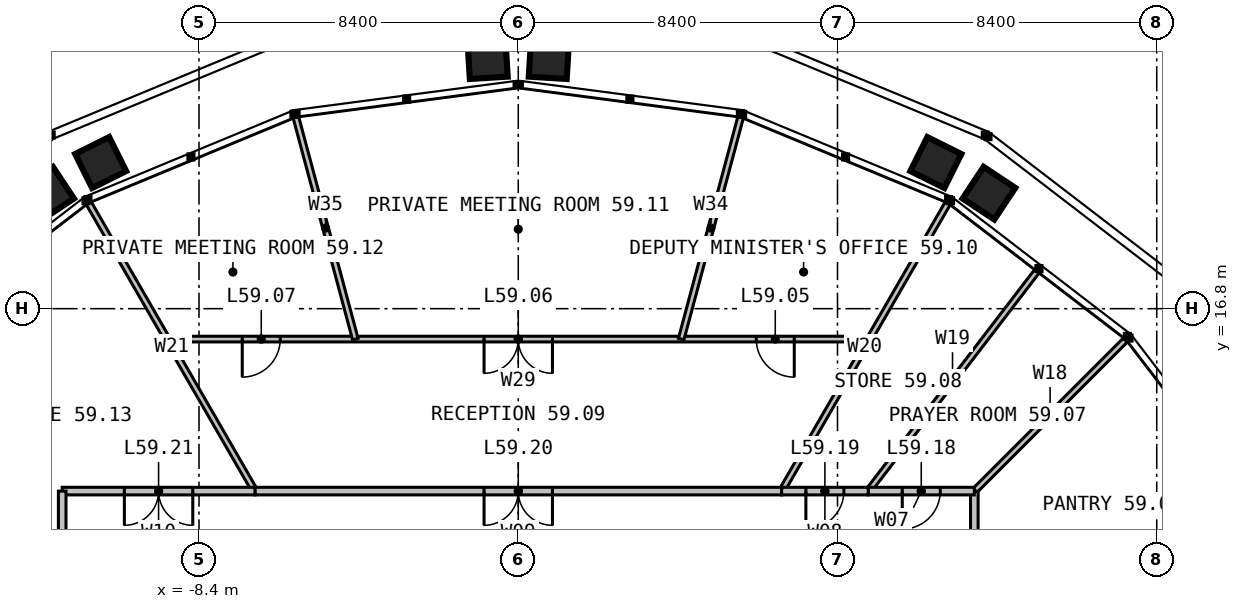
"""IFC4 building model, lengths in metres.
Left out: names, types, materials, properties, quantities, classifications, styles, units other than length and angle.
Written with IfcOpenShell. Run it as: python <this file> out.ifc"""

import sys

from ifc_helpers import new_model, si_unit, direction, frame, frame_2d, origin, place, context, subcontext, project, spatial, rectangle, extrude, element, fill, save


model = new_model("IFC4")
c1 = context("Model", 3, precision=1e-05, world=origin(), true_north=direction((0.0, 1.0)))
c2 = subcontext(c1, "Body", "Model", "MODEL_VIEW")
j1 = project(units=[si_unit("LENGTHUNIT", "METRE"), si_unit("PLANEANGLEUNIT", "RADIAN")], contexts=[c1])
p1 = place(None, origin())
s1 = spatial("IfcSite", under=j1, at=p1, CompositionType="ELEMENT")
p2 = place(p1, origin())
s2 = spatial("IfcBuilding", under=s1, at=p2, CompositionType="ELEMENT")
p3 = place(p2, frame((0.0, 0.0, 244.0)))
s3 = spatial("IfcBuildingStorey", under=s2, at=p3, CompositionType="ELEMENT", Elevation=244.0)
p4 = place(p3, frame((12.0, 6.928, 0.0), z_axis=(0.0, 0.0, 1.0), x_axis=(0.866020224182, 0.500008971228, 0.0)))
e1 = element("IfcWall", 1, at=p4, inside=s3, PredefinedType="PARTITIONING", context=c2, shape_type="SweptSolid", body=[
    extrude(rectangle(XDim=8.753, YDim=0.15, at=frame_2d((4.376, 0.0))), origin(), (0.0, 0.0, 1.0), 2.79),
])
p5 = place(p3, frame((12.0, 12.0, 0.0), z_axis=(0.0, 0.0, 1.0), x_axis=(0.707106781187, 0.707106781187, 0.0)))
e2 = element("IfcWall", 2, at=p5, inside=s3, PredefinedType="PARTITIONING", context=c2, shape_type="SweptSolid", body=[
    extrude(rectangle(XDim=5.639, YDim=0.15, at=frame_2d((2.819, 0.0))), origin(), (0.0, 0.0, 1.0), 2.79),
])
p6 = place(p3, frame((9.208, 12.0, 0.0), z_axis=(0.0, 0.0, 1.0), x_axis=(0.608740848729, 0.793369131671, 0.0)))
e3 = element("IfcWall", 3, at=p6, inside=s3, PredefinedType="PARTITIONING", context=c2, shape_type="SweptSolid", body=[
    extrude(rectangle(XDim=7.29, YDim=0.15, at=frame_2d((3.645, 0.0))), origin(), (0.0, 0.0, 1.0), 2.79),
])
for number, where, z_axis, x_axis in (
    (4, (6.928, 12.0, 0.0), (0.0, 0.0, 1.0), (0.5, 0.866, 0.0)),
    (5, (-6.928, 12.0, 0.0), (0.0, 0.0, 1.0), (-0.5, 0.866, 0.0)),
    (6, (-12.0, 6.928, 0.0), (0.0, 0.0, 1.0), (-0.866, 0.5, 0.0)),
):
    element("IfcWall", number, at=place(p3, frame(where, z_axis=z_axis, x_axis=x_axis)), inside=s3, PredefinedType="PARTITIONING", context=c2, shape_type="SweptSolid", body=[
        extrude(rectangle(XDim=8.753, YDim=0.15, at=frame_2d((4.376, 0.0))), origin(), (0.0, 0.0, 1.0), 2.79),
    ])
p7 = place(p3, frame((12.0, 6.928, 0.0), z_axis=(0.0, 0.0, 1.0), x_axis=(0.0, 1.0, 0.0)))
e7 = element("IfcWall", 7, at=p7, inside=s3, PredefinedType="PARTITIONING", context=c2, shape_type="SweptSolid", body=[
    extrude(rectangle(XDim=5.072, YDim=0.2, at=frame_2d((2.536, 0.0))), origin(), (0.0, 0.0, 1.0), 3.8),
])
p8 = place(p7, frame((2.036, 0.0, 0.0)))
e8 = element("IfcOpeningElement", 8, at=p8, cuts=e7, PredefinedType="OPENING", context=c2, shape_type="SweptSolid", body=[
    extrude(rectangle(XDim=1.0, YDim=2.2, at=frame_2d((0.5, 1.1))), frame((0.0, 0.11, 0.0), z_axis=(0.0, -1.0, 0.0), x_axis=(1.0, 0.0, 0.0)), (0.0, 0.0, 1.0), 0.22),
])
p9 = place(p3, frame((12.0, 12.0, 0.0), z_axis=(0.0, 0.0, 1.0), x_axis=(-1.0, 0.0, 0.0)))
e9 = element("IfcWall", 9, at=p9, inside=s3, PredefinedType="PARTITIONING", context=c2, shape_type="SweptSolid", body=[
    extrude(rectangle(XDim=2.792, YDim=0.2, at=frame_2d((1.396, 0.0))), origin(), (0.0, 0.0, 1.0), 3.8),
])
p10 = place(p9, frame((0.896, 0.0, 0.0)))
e10 = element("IfcOpeningElement", 10, at=p10, cuts=e9, PredefinedType="OPENING", context=c2, shape_type="SweptSolid", body=[
    extrude(rectangle(XDim=1.0, YDim=2.2, at=frame_2d((0.5, 1.1))), frame((0.0, 0.11, 0.0), z_axis=(0.0, -1.0, 0.0), x_axis=(1.0, 0.0, 0.0)), (0.0, 0.0, 1.0), 0.22),
])
p11 = place(p3, frame((9.208, 12.0, 0.0), z_axis=(0.0, 0.0, 1.0), x_axis=(-1.0, 0.0, 0.0)))
e11 = element("IfcWall", 11, at=p11, inside=s3, PredefinedType="PARTITIONING", context=c2, shape_type="SweptSolid", body=[
    extrude(rectangle(XDim=2.28, YDim=0.2, at=frame_2d((1.14, 0.0))), origin(), (0.0, 0.0, 1.0), 3.8),
])
p12 = place(p11, frame((0.64, 0.0, 0.0)))
e12 = element("IfcOpeningElement", 12, at=p12, cuts=e11, PredefinedType="OPENING", context=c2, shape_type="SweptSolid", body=[
    extrude(rectangle(XDim=1.0, YDim=2.2, at=frame_2d((0.5, 1.1))), frame((0.0, 0.11, 0.0), z_axis=(0.0, -1.0, 0.0), x_axis=(1.0, 0.0, 0.0)), (0.0, 0.0, 1.0), 0.22),
])
p13 = place(p3, frame((9.238, 16.0, 0.0), z_axis=(0.0, 0.0, 1.0), x_axis=(-1.0, 0.0, 0.0)))
e13 = element("IfcWall", 13, at=p13, inside=s3, PredefinedType="PARTITIONING", context=c2, shape_type="SweptSolid", body=[
    extrude(rectangle(XDim=18.475, YDim=0.15, at=frame_2d((9.238, 0.0))), origin(), (0.0, 0.0, 1.0), 2.79),
])
p14 = place(p13, frame((1.975, 0.0, 0.0)))
e14 = element("IfcOpeningElement", 14, at=p14, cuts=e13, PredefinedType="OPENING", context=c2, shape_type="SweptSolid", body=[
    extrude(rectangle(XDim=1.0, YDim=2.2, at=frame_2d((0.5, 1.1))), frame((0.0, 0.085, 0.0), z_axis=(0.0, -1.0, 0.0), x_axis=(1.0, 0.0, 0.0)), (0.0, 0.0, 1.0), 0.17),
])
p15 = place(p13, frame((8.338, 0.0, 0.0)))
e15 = element("IfcOpeningElement", 15, at=p15, cuts=e13, PredefinedType="OPENING", context=c2, shape_type="SweptSolid", body=[
    extrude(rectangle(XDim=1.8, YDim=2.2, at=frame_2d((0.9, 1.1))), frame((0.0, 0.085, 0.0), z_axis=(0.0, -1.0, 0.0), x_axis=(1.0, 0.0, 0.0)), (0.0, 0.0, 1.0), 0.17),
])
p16 = place(p13, frame((15.5, 0.0, 0.0)))
e16 = element("IfcOpeningElement", 16, at=p16, cuts=e13, PredefinedType="OPENING", context=c2, shape_type="SweptSolid", body=[
    extrude(rectangle(XDim=1.0, YDim=2.2, at=frame_2d((0.5, 1.1))), frame((0.0, 0.085, 0.0), z_axis=(0.0, -1.0, 0.0), x_axis=(1.0, 0.0, 0.0)), (0.0, 0.0, 1.0), 0.17),
])
for number, where, z_axis, x_axis in (
    (17, (4.287, 16.0, 0.0), (0.0, 0.0, 1.0), (0.259, 0.966, 0.0)),
    (18, (-4.287, 16.0, 0.0), (0.0, 0.0, 1.0), (-0.259, 0.966, 0.0)),
):
    element("IfcWall", number, at=place(p3, frame(where, z_axis=z_axis, x_axis=x_axis)), inside=s3, PredefinedType="PARTITIONING", context=c2, shape_type="SweptSolid", body=[
        extrude(rectangle(XDim=6.045, YDim=0.15, at=frame_2d((3.022, 0.0))), origin(), (0.0, 0.0, 1.0), 2.79),
    ])
p17 = place(p3, frame((6.928, 12.0, 0.0), z_axis=(0.0, 0.0, 1.0), x_axis=(-1.0, 0.0, 0.0)))
e19 = element("IfcWall", 19, at=p17, inside=s3, PredefinedType="PARTITIONING", context=c2, shape_type="SweptSolid", body=[
    extrude(rectangle(XDim=13.856, YDim=0.2, at=frame_2d((6.928, 0.0))), origin(), (0.0, 0.0, 1.0), 3.8),
])
p18 = place(p17, frame((6.028, 0.0, 0.0)))
e20 = element("IfcOpeningElement", 20, at=p18, cuts=e19, PredefinedType="OPENING", context=c2, shape_type="SweptSolid", body=[
    extrude(rectangle(XDim=1.8, YDim=2.2, at=frame_2d((0.9, 1.1))), frame((0.0, 0.11, 0.0), z_axis=(0.0, -1.0, 0.0), x_axis=(1.0, 0.0, 0.0)), (0.0, 0.0, 1.0), 0.22),
])
p19 = place(p3, frame((-6.928, 12.0, 0.0), z_axis=(0.0, 0.0, 1.0), x_axis=(-1.0, 0.0, 0.0)))
e21 = element("IfcWall", 21, at=p19, inside=s3, PredefinedType="PARTITIONING", context=c2, shape_type="SweptSolid", body=[
    extrude(rectangle(XDim=5.072, YDim=0.2, at=frame_2d((2.536, 0.0))), origin(), (0.0, 0.0, 1.0), 3.8),
])
p20 = place(p19, frame((1.636, 0.0, 0.0)))
e22 = element("IfcOpeningElement", 22, at=p20, cuts=e21, PredefinedType="OPENING", context=c2, shape_type="SweptSolid", body=[
    extrude(rectangle(XDim=1.8, YDim=2.2, at=frame_2d((0.9, 1.1))), frame((0.0, 0.11, 0.0), z_axis=(0.0, -1.0, 0.0), x_axis=(1.0, 0.0, 0.0)), (0.0, 0.0, 1.0), 0.22),
])
p21 = place(p3, frame((-12.0, 12.0, 0.0), z_axis=(0.0, 0.0, 1.0), x_axis=(0.0, -1.0, 0.0)))
e23 = element("IfcWall", 23, at=p21, inside=s3, PredefinedType="PARTITIONING", context=c2, shape_type="SweptSolid", body=[
    extrude(rectangle(XDim=5.072, YDim=0.2, at=frame_2d((2.536, 0.0))), origin(), (0.0, 0.0, 1.0), 3.8),
])
p22 = place(p10, origin())
e24 = element("IfcDoor", 24, at=p22, inside=s3, OperationType="SINGLE_SWING_RIGHT", PredefinedType="DOOR", context=c2, shape_type="SweptSolid", body=[
    extrude(rectangle(XDim=1.0, YDim=2.2, at=frame_2d((0.5, 1.1))), frame((0.0, 0.025, 0.0), z_axis=(0.0, -1.0, 0.0), x_axis=(1.0, 0.0, 0.0)), (0.0, 0.0, 1.0), 0.05),
])
fill(e10, e24)
p23 = place(p12, origin())
e25 = element("IfcDoor", 25, at=p23, inside=s3, OperationType="SINGLE_SWING_RIGHT", PredefinedType="DOOR", context=c2, shape_type="SweptSolid", body=[
    extrude(rectangle(XDim=1.0, YDim=2.2, at=frame_2d((0.5, 1.1))), frame((0.0, 0.025, 0.0), z_axis=(0.0, -1.0, 0.0), x_axis=(1.0, 0.0, 0.0)), (0.0, 0.0, 1.0), 0.05),
])
fill(e12, e25)
p24 = place(p14, origin())
e26 = element("IfcDoor", 26, at=p24, inside=s3, OperationType="SINGLE_SWING_LEFT", PredefinedType="DOOR", context=c2, shape_type="SweptSolid", body=[
    extrude(rectangle(XDim=1.0, YDim=2.2, at=frame_2d((0.5, 1.1))), frame((0.0, 0.025, 0.0), z_axis=(0.0, -1.0, 0.0), x_axis=(1.0, 0.0, 0.0)), (0.0, 0.0, 1.0), 0.05),
])
fill(e14, e26)
p25 = place(p15, origin())
e27 = element("IfcDoor", 27, at=p25, inside=s3, OperationType="DOUBLE_DOOR_SINGLE_SWING", PredefinedType="DOOR", context=c2, shape_type="SweptSolid", body=[
    extrude(rectangle(XDim=1.8, YDim=2.2, at=frame_2d((0.9, 1.1))), frame((0.0, 0.025, 0.0), z_axis=(0.0, -1.0, 0.0), x_axis=(1.0, 0.0, 0.0)), (0.0, 0.0, 1.0), 0.05),
])
fill(e15, e27)
p26 = place(p16, origin())
e28 = element("IfcDoor", 28, at=p26, inside=s3, OperationType="SINGLE_SWING_RIGHT", PredefinedType="DOOR", context=c2, shape_type="SweptSolid", body=[
    extrude(rectangle(XDim=1.0, YDim=2.2, at=frame_2d((0.5, 1.1))), frame((0.0, 0.025, 0.0), z_axis=(0.0, -1.0, 0.0), x_axis=(1.0, 0.0, 0.0)), (0.0, 0.0, 1.0), 0.05),
])
fill(e16, e28)
p27 = place(p18, origin())
e29 = element("IfcDoor", 29, at=p27, inside=s3, OperationType="DOUBLE_DOOR_SINGLE_SWING", PredefinedType="DOOR", context=c2, shape_type="SweptSolid", body=[
    extrude(rectangle(XDim=1.8, YDim=2.2, at=frame_2d((0.9, 1.1))), frame((0.0, 0.025, 0.0), z_axis=(0.0, -1.0, 0.0), x_axis=(1.0, 0.0, 0.0)), (0.0, 0.0, 1.0), 0.05),
])
fill(e20, e29)
p28 = place(p20, origin())
e30 = element("IfcDoor", 30, at=p28, inside=s3, OperationType="DOUBLE_DOOR_SINGLE_SWING", PredefinedType="DOOR", context=c2, shape_type="SweptSolid", body=[
    extrude(rectangle(XDim=1.8, YDim=2.2, at=frame_2d((0.9, 1.1))), frame((0.0, 0.025, 0.0), z_axis=(0.0, -1.0, 0.0), x_axis=(1.0, 0.0, 0.0)), (0.0, 0.0, 1.0), 0.05),
])
fill(e22, e30)
save(model, sys.argv[1])
